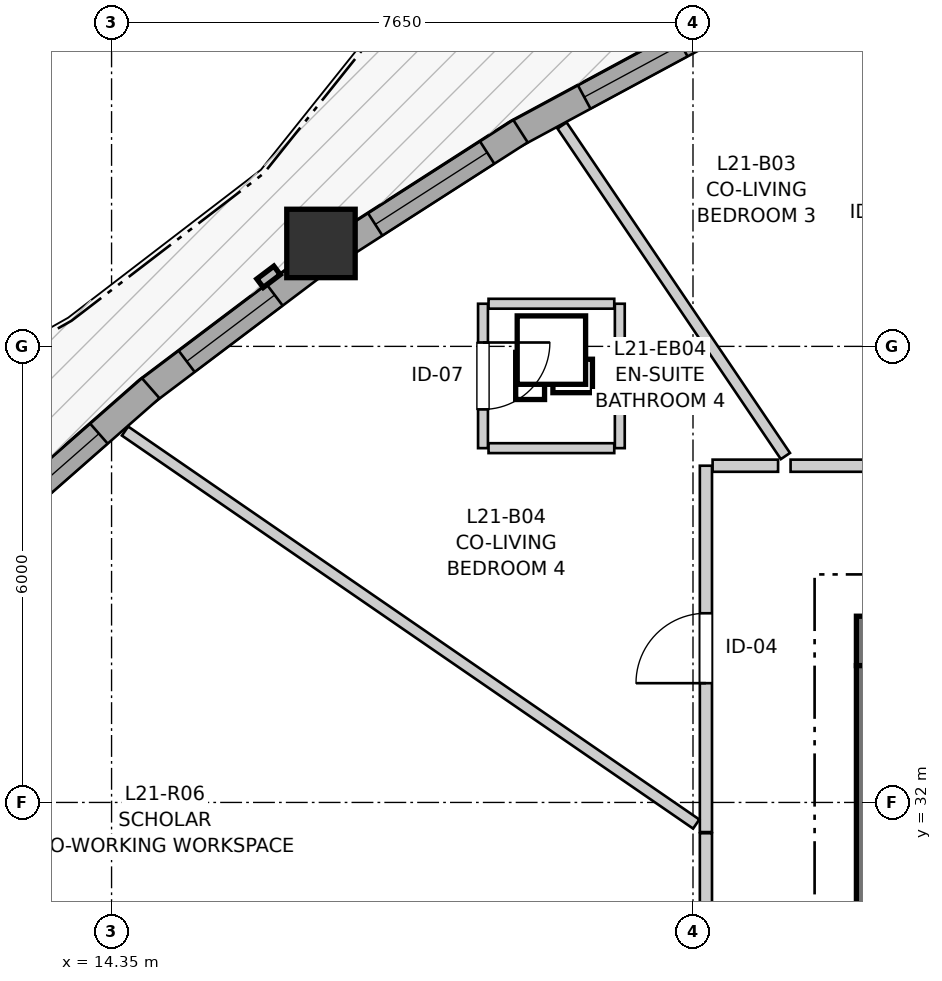
"""IFC4 building model, lengths in metres.
Left out: names, types, materials, properties, quantities, classifications, styles, units other than length and angle.
Written with IfcOpenShell. Run it as: python <this file> out.ifc"""

import sys

from ifc_helpers import new_model, si_unit, direction, frame, frame_2d, origin, origin_2d, place, context, subcontext, project, spatial, rectangle, extrude, source, transform, mapped, element, fill, save


model = new_model("IFC4")
c1 = context("Model", 3, precision=1e-05, world=origin(), true_north=direction((0.0, 1.0)))
c2 = subcontext(c1, "Body", "Model", "MODEL_VIEW")
j1 = project(units=[si_unit("LENGTHUNIT", "METRE"), si_unit("PLANEANGLEUNIT", "RADIAN")], contexts=[c1])
p1 = place(None, origin())
s1 = spatial("IfcSite", under=j1, at=p1, CompositionType="ELEMENT")
p2 = place(p1, origin())
s2 = spatial("IfcBuilding", under=s1, at=p2, CompositionType="ELEMENT")
p3 = place(p2, frame((0.0, 0.0, 73.6)))
s3 = spatial("IfcBuildingStorey", under=s2, at=p3, CompositionType="ELEMENT", Elevation=73.6)
p4 = place(p3, frame((36.55, 34.125, 0.0), z_axis=(0.0, 0.0, 1.0), x_axis=(-1.0, 0.0, 0.0)))
e1 = element("IfcWall", 1, at=p4, inside=s3, PredefinedType="SHEAR", context=c2, shape_type="SweptSolid", body=[
    extrude(rectangle(XDim=12.4, YDim=0.65, at=frame_2d((6.2, 0.0))), origin(), (0.0, 0.0, 1.0), 2.95),
])
p5 = place(p3, frame((24.475, 33.8, 0.0), z_axis=(0.0, 0.0, 1.0), x_axis=(0.0, -1.0, 0.0)))
e2 = element("IfcWall", 2, at=p5, inside=s3, PredefinedType="SHEAR", context=c2, shape_type="SweptSolid", body=[
    extrude(rectangle(XDim=15.6, YDim=0.65, at=frame_2d((7.8, 0.0))), origin(), (0.0, 0.0, 1.0), 2.95),
])
p6 = place(p5, frame((7.05, 0.0, 0.0)))
e3 = element("IfcOpeningElement", 3, at=p6, cuts=e2, PredefinedType="OPENING", context=c2, shape_type="SweptSolid", body=[
    extrude(rectangle(XDim=1.5, YDim=2.15, at=frame_2d((0.75, 1.075))), frame((0.0, 0.335, 0.0), z_axis=(0.0, -1.0, 0.0), x_axis=(1.0, 0.0, 0.0)), (0.0, 0.0, 1.0), 0.67),
])
p7 = place(p5, frame((3.52, 0.0, 0.0)))
e4 = element("IfcOpeningElement", 4, at=p7, cuts=e2, PredefinedType="OPENING", context=c2, shape_type="SweptSolid", body=[
    extrude(rectangle(XDim=0.86, YDim=2.05, at=frame_2d((0.43, 1.025))), frame((0.0, 0.335, 0.0), z_axis=(0.0, -1.0, 0.0), x_axis=(1.0, 0.0, 0.0)), (0.0, 0.0, 1.0), 0.67),
])
p8 = place(p5, frame((11.22, 0.0, 0.0)))
e5 = element("IfcOpeningElement", 5, at=p8, cuts=e2, PredefinedType="OPENING", context=c2, shape_type="SweptSolid", body=[
    extrude(rectangle(XDim=0.86, YDim=2.05, at=frame_2d((0.43, 1.025))), frame((0.0, 0.335, 0.0), z_axis=(0.0, -1.0, 0.0), x_axis=(1.0, 0.0, 0.0)), (0.0, 0.0, 1.0), 0.67),
])
m1 = source(origin(), c2, "Body", "SweptSolid", [
    extrude(rectangle(XDim=0.9, YDim=0.9, at=origin_2d()), origin(), (0.0, 0.0, 1.0), 2.95),
])
p9 = place(p3, frame((17.105, 39.354, 0.0), z_axis=(0.0, 0.0, 1.0), x_axis=(1.0, 0.0, 0.0)))
e6 = element("IfcColumn", 6, at=p9, inside=s3, PredefinedType="COLUMN", context=c2, shape_type="MappedRepresentation", body=[
    mapped(m1, transform((0.0, 0.0, 0.0), x_axis=(1.0, 0.0, 0.0), y_axis=(0.0, 1.0, 0.0), z_axis=(0.0, 0.0, 1.0), scale=1.0)),
])
p10 = place(p3, frame((22.282, 42.204, 0.0), z_axis=(0.0, 0.0, 1.0), x_axis=(-0.880100783756, -0.474786910553, 0.0)))
e7 = element("IfcWall", 7, at=p10, inside=s3, PredefinedType="SOLIDWALL", context=c2, shape_type="SweptSolid", body=[
    extrude(rectangle(XDim=2.987, YDim=0.35, at=frame_2d((1.494, 0.0))), origin(), (0.0, 0.0, 1.0), 2.48),
])
p11 = place(p10, frame((0.497, 0.0, 0.82)))
e8 = element("IfcOpeningElement", 8, at=p11, cuts=e7, PredefinedType="OPENING", context=c2, shape_type="SweptSolid", body=[
    extrude(rectangle(XDim=1.45, YDim=1.25, at=frame_2d((0.725, 0.625))), frame((0.0, 0.185, 0.0), z_axis=(0.0, -1.0, 0.0), x_axis=(1.0, 0.0, 0.0)), (0.0, 0.0, 1.0), 0.37),
])
p12 = place(p3, frame((19.73, 40.831, 0.0), z_axis=(0.0, 0.0, 1.0), x_axis=(-0.841577423868, -0.540136500929, 0.0)))
e9 = element("IfcWall", 9, at=p12, inside=s3, PredefinedType="SOLIDWALL", context=c2, shape_type="SweptSolid", body=[
    extrude(rectangle(XDim=2.782, YDim=0.35, at=frame_2d((1.391, 0.0))), origin(), (0.0, 0.0, 1.0), 2.48),
])
p13 = place(p12, frame((0.521, 0.0, 0.82)))
e10 = element("IfcOpeningElement", 10, at=p13, cuts=e9, PredefinedType="OPENING", context=c2, shape_type="SweptSolid", body=[
    extrude(rectangle(XDim=1.75, YDim=1.3, at=frame_2d((0.875, 0.65))), frame((0.0, 0.185, 0.0), z_axis=(0.0, -1.0, 0.0), x_axis=(1.0, 0.0, 0.0)), (0.0, 0.0, 1.0), 0.37),
])
p14 = place(p3, frame((17.031, 39.079, 0.0), z_axis=(0.0, 0.0, 1.0), x_axis=(-0.798385341516, -0.602146864521, 0.0)))
e11 = element("IfcWall", 11, at=p14, inside=s3, PredefinedType="SOLIDWALL", context=c2, shape_type="SweptSolid", body=[
    extrude(rectangle(XDim=2.799, YDim=0.35, at=frame_2d((1.4, 0.0))), origin(), (0.0, 0.0, 1.0), 2.48),
])
p15 = place(p14, frame((0.67, 0.0, 0.82)))
e12 = element("IfcOpeningElement", 12, at=p15, cuts=e11, PredefinedType="OPENING", context=c2, shape_type="SweptSolid", body=[
    extrude(rectangle(XDim=1.45, YDim=1.25, at=frame_2d((0.725, 0.625))), frame((0.0, 0.185, 0.0), z_axis=(0.0, -1.0, 0.0), x_axis=(1.0, 0.0, 0.0)), (0.0, 0.0, 1.0), 0.37),
])
p16 = place(p3, frame((14.865, 37.45, 0.0), z_axis=(0.0, 0.0, 1.0), x_axis=(-0.751505335107, -0.659727012715, 0.0)))
e13 = element("IfcWall", 13, at=p16, inside=s3, PredefinedType="SOLIDWALL", context=c2, shape_type="SweptSolid", body=[
    extrude(rectangle(XDim=3.038, YDim=0.35, at=frame_2d((1.519, 0.0))), origin(), (0.0, 0.0, 1.0), 2.48),
])
p17 = place(p16, frame((0.906, 0.0, 0.82)))
e14 = element("IfcOpeningElement", 14, at=p17, cuts=e13, PredefinedType="OPENING", context=c2, shape_type="SweptSolid", body=[
    extrude(rectangle(XDim=1.8, YDim=1.45, at=frame_2d((0.9, 0.725))), frame((0.0, 0.185, 0.0), z_axis=(0.0, -1.0, 0.0), x_axis=(1.0, 0.0, 0.0)), (0.0, 0.0, 1.0), 0.37),
])
p18 = place(p3, frame((23.284, 36.43, 0.0), z_axis=(0.0, 0.0, 1.0), x_axis=(1.0, 0.0, 0.0)))
e15 = element("IfcWall", 15, at=p18, inside=s3, PredefinedType="PARTITIONING", context=c2, shape_type="SweptSolid", body=[
    extrude(rectangle(XDim=4.845, YDim=0.16, at=frame_2d((2.422, 0.0))), origin(), (0.0, 0.0, 1.0), 2.588),
])
p19 = place(p18, frame((1.963, 0.0, 0.0)))
e16 = element("IfcOpeningElement", 16, at=p19, cuts=e15, PredefinedType="OPENING", context=c2, shape_type="SweptSolid", body=[
    extrude(rectangle(XDim=0.92, YDim=2.1, at=frame_2d((0.46, 1.05))), frame((0.0, 0.09, 0.0), z_axis=(0.0, -1.0, 0.0), x_axis=(1.0, 0.0, 0.0)), (0.0, 0.0, 1.0), 0.18),
])
p20 = place(p3, frame((22.17, 31.61, 0.0), z_axis=(0.0, 0.0, 1.0), x_axis=(0.0, 1.0, 0.0)))
e17 = element("IfcWall", 17, at=p20, inside=s3, PredefinedType="PARTITIONING", context=c2, shape_type="SweptSolid", body=[
    extrude(rectangle(XDim=4.82, YDim=0.16, at=frame_2d((2.41, 0.0))), origin(), (0.0, 0.0, 1.0), 2.95),
])
p21 = place(p20, frame((1.959, 0.0, 0.0)))
e18 = element("IfcOpeningElement", 18, at=p21, cuts=e17, PredefinedType="OPENING", context=c2, shape_type="SweptSolid", body=[
    extrude(rectangle(XDim=0.92, YDim=2.1, at=frame_2d((0.46, 1.05))), frame((0.0, 0.09, 0.0), z_axis=(0.0, -1.0, 0.0), x_axis=(1.0, 0.0, 0.0)), (0.0, 0.0, 1.0), 0.18),
])
p22 = place(p3, frame((22.17, 27.85, 0.0), z_axis=(0.0, 0.0, 1.0), x_axis=(0.0, 1.0, 0.0)))
e19 = element("IfcWall", 19, at=p22, inside=s3, PredefinedType="PARTITIONING", context=c2, shape_type="SweptSolid", body=[
    extrude(rectangle(XDim=3.745, YDim=0.16, at=frame_2d((1.873, 0.0))), origin(), (0.0, 0.0, 1.0), 2.95),
])
p23 = place(p22, frame((1.438, 0.0, 0.0)))
e20 = element("IfcOpeningElement", 20, at=p23, cuts=e19, PredefinedType="OPENING", context=c2, shape_type="SweptSolid", body=[
    extrude(rectangle(XDim=0.96, YDim=2.1, at=frame_2d((0.48, 1.05))), frame((0.0, 0.09, 0.0), z_axis=(0.0, -1.0, 0.0), x_axis=(1.0, 0.0, 0.0)), (0.0, 0.0, 1.0), 0.18),
])
p24 = place(p3, frame((19.237, 38.561, 0.0), z_axis=(0.0, 0.0, 1.0), x_axis=(0.0, -1.0, 0.0)))
e21 = element("IfcWall", 21, at=p24, inside=s3, PredefinedType="PARTITIONING", context=c2, shape_type="SweptSolid", body=[
    extrude(rectangle(XDim=1.9, YDim=0.13, at=frame_2d((0.95, 0.0))), origin(), (0.0, 0.0, 1.0), 2.95),
])
p25 = place(p24, frame((0.51, 0.0, 0.0)))
e22 = element("IfcOpeningElement", 22, at=p25, cuts=e21, PredefinedType="OPENING", context=c2, shape_type="SweptSolid", body=[
    extrude(rectangle(XDim=0.88, YDim=2.05, at=frame_2d((0.44, 1.025))), frame((0.0, 0.075, 0.0), z_axis=(0.0, -1.0, 0.0), x_axis=(1.0, 0.0, 0.0)), (0.0, 0.0, 1.0), 0.15),
])
p26 = place(p3, frame((14.527, 36.886, 0.0), z_axis=(0.0, 0.0, 1.0), x_axis=(0.823849772282, -0.566808215106, 0.0)))
e23 = element("IfcWall", 23, at=p26, inside=s3, PredefinedType="PARTITIONING", context=c2, shape_type="SweptSolid", body=[
    extrude(rectangle(XDim=9.122, YDim=0.145, at=frame_2d((4.561, 0.0))), origin(), (0.0, 0.0, 1.0), 2.95),
])
p27 = place(p3, frame((20.277, 40.906, 0.0), z_axis=(0.0, 0.0, 1.0), x_axis=(0.559905741259, -0.828556311246, 0.0)))
e24 = element("IfcWall", 24, at=p27, inside=s3, PredefinedType="PARTITIONING", context=c2, shape_type="SweptSolid", body=[
    extrude(rectangle(XDim=5.249, YDim=0.145, at=frame_2d((2.625, 0.0))), origin(), (0.0, 0.0, 1.0), 2.95),
])
p28 = place(p3, frame((21.037, 36.661, 0.0), z_axis=(0.0, 0.0, 1.0), x_axis=(0.0, 1.0, 0.0)))
e25 = element("IfcWall", 25, at=p28, inside=s3, PredefinedType="PARTITIONING", context=c2, shape_type="SweptSolid", body=[
    extrude(rectangle(XDim=1.9, YDim=0.13, at=frame_2d((0.95, 0.0))), origin(), (0.0, 0.0, 1.0), 2.95),
])
for number, where, z_axis, x_axis in (
    (26, (19.31, 38.561, 0.0), (0.0, 0.0, 1.0), (1.0, 0.0, 0.0)),
    (27, (19.31, 36.661, 0.0), (0.0, 0.0, 1.0), (1.0, 0.0, 0.0)),
):
    element("IfcWall", number, at=place(p3, frame(where, z_axis=z_axis, x_axis=x_axis)), inside=s3, PredefinedType="PARTITIONING", context=c2, shape_type="SweptSolid", body=[
        extrude(rectangle(XDim=1.654, YDim=0.13, at=frame_2d((0.827, 0.0))), origin(), (0.0, 0.0, 1.0), 2.95),
    ])
p29 = place(p3, frame((22.258, 36.43, 0.0), z_axis=(0.0, 0.0, 1.0), x_axis=(1.0, 0.0, 0.0)))
e28 = element("IfcWall", 28, at=p29, inside=s3, PredefinedType="PARTITIONING", context=c2, shape_type="SweptSolid", body=[
    extrude(rectangle(XDim=0.861, YDim=0.16, at=frame_2d((0.431, 0.0))), origin(), (0.0, 0.0, 1.0), 2.95),
])
m2 = source(origin(), c2, "Body", "SweptSolid", [
    extrude(rectangle(XDim=1.45, YDim=1.25, at=frame_2d((0.725, 0.625))), frame((0.0, 0.03, 0.0), z_axis=(0.0, -1.0, 0.0), x_axis=(1.0, 0.0, 0.0)), (0.0, 0.0, 1.0), 0.06),
])
p30 = place(p11, origin())
e29 = element("IfcWindow", 29, at=p30, inside=s3, PartitioningType="SINGLE_PANEL", PredefinedType="WINDOW", context=c2, shape_type="MappedRepresentation", body=[
    mapped(m2, transform((0.0, 0.0, 0.0), x_axis=(1.0, 0.0, 0.0), y_axis=(0.0, 1.0, 0.0), z_axis=(0.0, 0.0, 1.0), scale=1.0)),
])
fill(e8, e29)
m3 = source(origin(), c2, "Body", "SweptSolid", [
    extrude(rectangle(XDim=1.75, YDim=1.3, at=frame_2d((0.875, 0.65))), frame((0.0, 0.03, 0.0), z_axis=(0.0, -1.0, 0.0), x_axis=(1.0, 0.0, 0.0)), (0.0, 0.0, 1.0), 0.06),
])
p31 = place(p13, origin())
e30 = element("IfcWindow", 30, at=p31, inside=s3, PartitioningType="SINGLE_PANEL", PredefinedType="WINDOW", context=c2, shape_type="MappedRepresentation", body=[
    mapped(m3, transform((0.0, 0.0, 0.0), x_axis=(1.0, 0.0, 0.0), y_axis=(0.0, 1.0, 0.0), z_axis=(0.0, 0.0, 1.0), scale=1.0)),
])
fill(e10, e30)
p32 = place(p15, origin())
e31 = element("IfcWindow", 31, at=p32, inside=s3, PartitioningType="SINGLE_PANEL", PredefinedType="WINDOW", context=c2, shape_type="MappedRepresentation", body=[
    mapped(m2, transform((0.0, 0.0, 0.0), x_axis=(1.0, 0.0, 0.0), y_axis=(0.0, 1.0, 0.0), z_axis=(0.0, 0.0, 1.0), scale=1.0)),
])
fill(e12, e31)
m4 = source(origin(), c2, "Body", "SweptSolid", [
    extrude(rectangle(XDim=1.8, YDim=1.45, at=frame_2d((0.9, 0.725))), frame((0.0, 0.03, 0.0), z_axis=(0.0, -1.0, 0.0), x_axis=(1.0, 0.0, 0.0)), (0.0, 0.0, 1.0), 0.06),
])
p33 = place(p17, origin())
e32 = element("IfcWindow", 32, at=p33, inside=s3, PartitioningType="SINGLE_PANEL", PredefinedType="WINDOW", context=c2, shape_type="MappedRepresentation", body=[
    mapped(m4, transform((0.0, 0.0, 0.0), x_axis=(1.0, 0.0, 0.0), y_axis=(0.0, 1.0, 0.0), z_axis=(0.0, 0.0, 1.0), scale=1.0)),
])
fill(e14, e32)
m5 = source(origin(), c2, "Body", "SweptSolid", [
    extrude(rectangle(XDim=0.92, YDim=2.1, at=frame_2d((0.46, 1.05))), frame((0.0, 0.025, 0.0), z_axis=(0.0, -1.0, 0.0), x_axis=(1.0, 0.0, 0.0)), (0.0, 0.0, 1.0), 0.05),
])
p34 = place(p21, origin())
e33 = element("IfcDoor", 33, at=p34, inside=s3, OperationType="SINGLE_SWING_LEFT", PredefinedType="DOOR", context=c2, shape_type="MappedRepresentation", body=[
    mapped(m5, transform((0.0, 0.0, 0.0), x_axis=(1.0, 0.0, 0.0), y_axis=(0.0, 1.0, 0.0), z_axis=(0.0, 0.0, 1.0), scale=1.0)),
])
fill(e18, e33)
m6 = source(origin(), c2, "Body", "SweptSolid", [
    extrude(rectangle(XDim=0.88, YDim=2.05, at=frame_2d((0.44, 1.025))), frame((0.0, 0.025, 0.0), z_axis=(0.0, -1.0, 0.0), x_axis=(1.0, 0.0, 0.0)), (0.0, 0.0, 1.0), 0.05),
])
p35 = place(p25, origin())
e34 = element("IfcDoor", 34, at=p35, inside=s3, OperationType="SINGLE_SWING_LEFT", PredefinedType="DOOR", context=c2, shape_type="MappedRepresentation", body=[
    mapped(m6, transform((0.0, 0.0, 0.0), x_axis=(1.0, 0.0, 0.0), y_axis=(0.0, 1.0, 0.0), z_axis=(0.0, 0.0, 1.0), scale=1.0)),
])
fill(e22, e34)
save(model, sys.argv[1])
